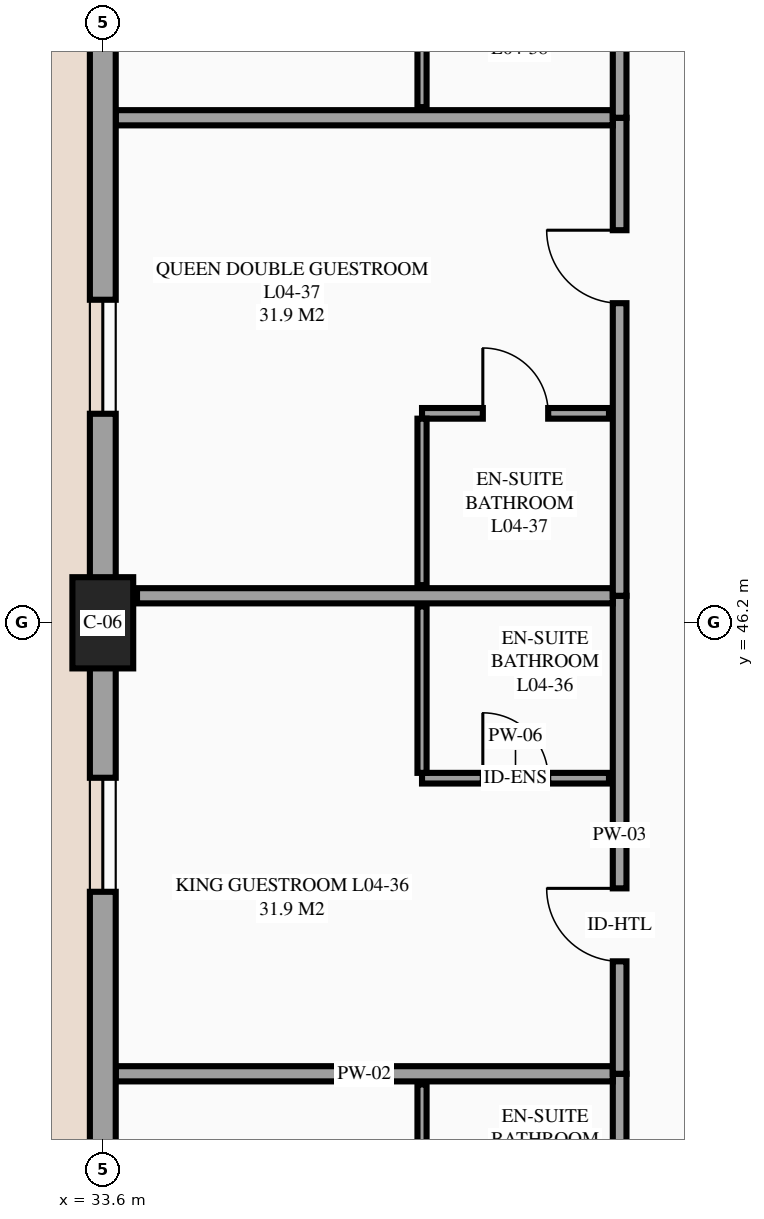
"""IFC4 building model, lengths in metres.
Left out: names, types, materials, properties, quantities, classifications, styles, units other than length and angle.
Written with IfcOpenShell. Run it as: python <this file> out.ifc"""

import sys

from ifc_helpers import new_model, si_unit, direction, frame, frame_2d, origin, origin_2d, place, context, subcontext, project, spatial, rectangle, extrude, element, fill, save


model = new_model("IFC4")
c1 = context("Model", 3, precision=1e-05, world=origin(), true_north=direction((0.0, 1.0)))
c2 = subcontext(c1, "Body", "Model", "MODEL_VIEW")
j1 = project(units=[si_unit("LENGTHUNIT", "METRE"), si_unit("PLANEANGLEUNIT", "RADIAN")], contexts=[c1])
p1 = place(None, origin())
s1 = spatial("IfcSite", under=j1, at=p1, CompositionType="ELEMENT")
p2 = place(p1, origin())
s2 = spatial("IfcBuilding", under=s1, at=p2, CompositionType="ELEMENT")
p3 = place(p2, frame((0.0, 0.0, 18.3)))
s3 = spatial("IfcBuildingStorey", under=s2, at=p3, CompositionType="ELEMENT", Elevation=18.3)
p4 = place(p3, frame((33.6, 46.2, 0.0), z_axis=(0.0, 0.0, 1.0), x_axis=(1.0, 0.0, 0.0)))
e1 = element("IfcColumn", 1, at=p4, inside=s3, PredefinedType="COLUMN", context=c2, shape_type="SweptSolid", body=[
    extrude(rectangle(XDim=0.8, YDim=1.2, at=origin_2d()), origin(), (0.0, 0.0, 1.0), 3.6),
])
p5 = place(p3, frame((40.4, 33.978, 0.0), z_axis=(0.0, 0.0, 1.0), x_axis=(0.0, 1.0, 0.0)))
e2 = element("IfcWall", 2, at=p5, inside=s3, PredefinedType="PARTITIONING", context=c2, shape_type="SweptSolid", body=[
    extrude(rectangle(XDim=6.289, YDim=0.18, at=frame_2d((3.145, 0.0))), origin(), (0.0, 0.0, 1.0), 3.375),
])
p6 = place(p5, frame((1.479, 0.0, 0.0)))
e3 = element("IfcOpeningElement", 3, at=p6, cuts=e2, PredefinedType="OPENING", context=c2, shape_type="SweptSolid", body=[
    extrude(rectangle(XDim=0.96, YDim=2.15, at=frame_2d((0.48, 1.075))), frame((0.0, 0.1, 0.0), z_axis=(0.0, -1.0, 0.0), x_axis=(1.0, 0.0, 0.0)), (0.0, 0.0, 1.0), 0.2),
])
p7 = place(p3, frame((33.77, 40.267, 0.0), z_axis=(0.0, 0.0, 1.0), x_axis=(1.0, 0.0, 0.0)))
e4 = element("IfcWall", 4, at=p7, inside=s3, PredefinedType="PARTITIONING", context=c2, shape_type="SweptSolid", body=[
    extrude(rectangle(XDim=6.54, YDim=0.2, at=frame_2d((3.27, 0.0))), origin(), (0.0, 0.0, 1.0), 3.375),
])
p8 = place(p3, frame((37.8, 37.937, 0.0), z_axis=(0.0, 0.0, 1.0), x_axis=(0.0, 1.0, 0.0)))
e5 = element("IfcWall", 5, at=p8, inside=s3, PredefinedType="PARTITIONING", context=c2, shape_type="SweptSolid", body=[
    extrude(rectangle(XDim=2.19, YDim=0.12, at=frame_2d((1.095, 0.0))), origin(), (0.0, 0.0, 1.0), 3.375),
])
p9 = place(p3, frame((40.4, 40.267, 0.0), z_axis=(0.0, 0.0, 1.0), x_axis=(0.0, 1.0, 0.0)))
e6 = element("IfcWall", 6, at=p9, inside=s3, PredefinedType="PARTITIONING", context=c2, shape_type="SweptSolid", body=[
    extrude(rectangle(XDim=6.289, YDim=0.18, at=frame_2d((3.145, 0.0))), origin(), (0.0, 0.0, 1.0), 3.375),
])
p10 = place(p9, frame((1.479, 0.0, 0.0)))
e7 = element("IfcOpeningElement", 7, at=p10, cuts=e6, PredefinedType="OPENING", context=c2, shape_type="SweptSolid", body=[
    extrude(rectangle(XDim=0.96, YDim=2.15, at=frame_2d((0.48, 1.075))), frame((0.0, 0.1, 0.0), z_axis=(0.0, -1.0, 0.0), x_axis=(1.0, 0.0, 0.0)), (0.0, 0.0, 1.0), 0.2),
])
p11 = place(p3, frame((34.05, 46.556, 0.0), z_axis=(0.0, 0.0, 1.0), x_axis=(1.0, 0.0, 0.0)))
e8 = element("IfcWall", 8, at=p11, inside=s3, PredefinedType="PARTITIONING", context=c2, shape_type="SweptSolid", body=[
    extrude(rectangle(XDim=6.26, YDim=0.2, at=frame_2d((3.13, 0.0))), origin(), (0.0, 0.0, 1.0), 3.375),
])
p12 = place(p3, frame((37.8, 44.156, 0.0), z_axis=(0.0, 0.0, 1.0), x_axis=(1.0, 0.0, 0.0)))
e9 = element("IfcWall", 9, at=p12, inside=s3, PredefinedType="PARTITIONING", context=c2, shape_type="SweptSolid", body=[
    extrude(rectangle(XDim=2.46, YDim=0.14, at=frame_2d((1.23, 0.0))), origin(), (0.0, 0.0, 1.0), 3.375),
])
p13 = place(p12, frame((0.8, 0.0, 0.0)))
e10 = element("IfcOpeningElement", 10, at=p13, cuts=e9, PredefinedType="OPENING", context=c2, shape_type="SweptSolid", body=[
    extrude(rectangle(XDim=0.86, YDim=2.1, at=frame_2d((0.43, 1.05))), frame((0.0, 0.08, 0.0), z_axis=(0.0, -1.0, 0.0), x_axis=(1.0, 0.0, 0.0)), (0.0, 0.0, 1.0), 0.16),
])
p14 = place(p3, frame((37.8, 44.226, 0.0), z_axis=(0.0, 0.0, 1.0), x_axis=(0.0, 1.0, 0.0)))
e11 = element("IfcWall", 11, at=p14, inside=s3, PredefinedType="PARTITIONING", context=c2, shape_type="SweptSolid", body=[
    extrude(rectangle(XDim=2.19, YDim=0.12, at=frame_2d((1.095, 0.0))), origin(), (0.0, 0.0, 1.0), 3.375),
])
p15 = place(p3, frame((40.4, 46.556, 0.0), z_axis=(0.0, 0.0, 1.0), x_axis=(0.0, 1.0, 0.0)))
e12 = element("IfcWall", 12, at=p15, inside=s3, PredefinedType="PARTITIONING", context=c2, shape_type="SweptSolid", body=[
    extrude(rectangle(XDim=6.289, YDim=0.18, at=frame_2d((3.145, 0.0))), origin(), (0.0, 0.0, 1.0), 3.375),
])
p16 = place(p15, frame((3.849, 0.0, 0.0)))
e13 = element("IfcOpeningElement", 13, at=p16, cuts=e12, PredefinedType="OPENING", context=c2, shape_type="SweptSolid", body=[
    extrude(rectangle(XDim=0.96, YDim=2.15, at=frame_2d((0.48, 1.075))), frame((0.0, 0.1, 0.0), z_axis=(0.0, -1.0, 0.0), x_axis=(1.0, 0.0, 0.0)), (0.0, 0.0, 1.0), 0.2),
])
p17 = place(p3, frame((33.77, 52.844, 0.0), z_axis=(0.0, 0.0, 1.0), x_axis=(1.0, 0.0, 0.0)))
e14 = element("IfcWall", 14, at=p17, inside=s3, PredefinedType="PARTITIONING", context=c2, shape_type="SweptSolid", body=[
    extrude(rectangle(XDim=6.54, YDim=0.2, at=frame_2d((3.27, 0.0))), origin(), (0.0, 0.0, 1.0), 3.375),
])
p18 = place(p3, frame((37.8, 48.956, 0.0), z_axis=(0.0, 0.0, 1.0), x_axis=(1.0, 0.0, 0.0)))
e15 = element("IfcWall", 15, at=p18, inside=s3, PredefinedType="PARTITIONING", context=c2, shape_type="SweptSolid", body=[
    extrude(rectangle(XDim=2.46, YDim=0.14, at=frame_2d((1.23, 0.0))), origin(), (0.0, 0.0, 1.0), 3.375),
])
p19 = place(p18, frame((0.8, 0.0, 0.0)))
e16 = element("IfcOpeningElement", 16, at=p19, cuts=e15, PredefinedType="OPENING", context=c2, shape_type="SweptSolid", body=[
    extrude(rectangle(XDim=0.86, YDim=2.1, at=frame_2d((0.43, 1.05))), frame((0.0, 0.08, 0.0), z_axis=(0.0, -1.0, 0.0), x_axis=(1.0, 0.0, 0.0)), (0.0, 0.0, 1.0), 0.16),
])
p20 = place(p3, frame((37.8, 46.696, 0.0), z_axis=(0.0, 0.0, 1.0), x_axis=(0.0, 1.0, 0.0)))
e17 = element("IfcWall", 17, at=p20, inside=s3, PredefinedType="PARTITIONING", context=c2, shape_type="SweptSolid", body=[
    extrude(rectangle(XDim=2.19, YDim=0.12, at=frame_2d((1.095, 0.0))), origin(), (0.0, 0.0, 1.0), 3.375),
])
p21 = place(p3, frame((40.4, 52.844, 0.0), z_axis=(0.0, 0.0, 1.0), x_axis=(0.0, 1.0, 0.0)))
e18 = element("IfcWall", 18, at=p21, inside=s3, PredefinedType="PARTITIONING", context=c2, shape_type="SweptSolid", body=[
    extrude(rectangle(XDim=6.289, YDim=0.18, at=frame_2d((3.145, 0.0))), origin(), (0.0, 0.0, 1.0), 3.375),
])
p22 = place(p21, frame((3.85, 0.0, 0.0)))
e19 = element("IfcOpeningElement", 19, at=p22, cuts=e18, PredefinedType="OPENING", context=c2, shape_type="SweptSolid", body=[
    extrude(rectangle(XDim=0.96, YDim=2.15, at=frame_2d((0.48, 1.075))), frame((0.0, 0.1, 0.0), z_axis=(0.0, -1.0, 0.0), x_axis=(1.0, 0.0, 0.0)), (0.0, 0.0, 1.0), 0.2),
])
p23 = place(p3, frame((37.8, 52.984, 0.0), z_axis=(0.0, 0.0, 1.0), x_axis=(0.0, 1.0, 0.0)))
e20 = element("IfcWall", 20, at=p23, inside=s3, PredefinedType="PARTITIONING", context=c2, shape_type="SweptSolid", body=[
    extrude(rectangle(XDim=2.19, YDim=0.12, at=frame_2d((1.095, 0.0))), origin(), (0.0, 0.0, 1.0), 3.375),
])
p24 = place(p3, frame((33.6, 54.6, 0.0), z_axis=(0.0, 0.0, 1.0), x_axis=(0.0, -1.0, 0.0)))
e21 = element("IfcWall", 21, at=p24, inside=s3, PredefinedType="STANDARD", context=c2, shape_type="SweptSolid", body=[
    extrude(rectangle(XDim=8.4, YDim=0.34, at=frame_2d((4.2, 0.0))), origin(), (0.0, 0.0, 1.0), 2.53),
])
p25 = place(p24, frame((4.15, 0.0, 0.85)))
e22 = element("IfcOpeningElement", 22, at=p25, cuts=e21, PredefinedType="OPENING", context=c2, shape_type="SweptSolid", body=[
    extrude(rectangle(XDim=1.5, YDim=1.5, at=frame_2d((0.75, 0.75))), frame((0.0, 0.18, 0.0), z_axis=(0.0, -1.0, 0.0), x_axis=(1.0, 0.0, 0.0)), (0.0, 0.0, 1.0), 0.36),
])
p26 = place(p3, frame((33.6, 46.2, 0.0), z_axis=(0.0, 0.0, 1.0), x_axis=(0.0, -1.0, 0.0)))
e23 = element("IfcWall", 23, at=p26, inside=s3, PredefinedType="STANDARD", context=c2, shape_type="SweptSolid", body=[
    extrude(rectangle(XDim=8.4, YDim=0.34, at=frame_2d((4.2, 0.0))), origin(), (0.0, 0.0, 1.0), 2.43),
])
p27 = place(p26, frame((2.039, 0.0, 0.85)))
e24 = element("IfcOpeningElement", 24, at=p27, cuts=e23, PredefinedType="OPENING", context=c2, shape_type="SweptSolid", body=[
    extrude(rectangle(XDim=1.5, YDim=1.5, at=frame_2d((0.75, 0.75))), frame((0.0, 0.18, 0.0), z_axis=(0.0, -1.0, 0.0), x_axis=(1.0, 0.0, 0.0)), (0.0, 0.0, 1.0), 0.36),
])
p28 = place(p27, origin())
e25 = element("IfcWindow", 25, at=p28, inside=s3, PartitioningType="SINGLE_PANEL", PredefinedType="WINDOW", context=c2, shape_type="SweptSolid", body=[
    extrude(rectangle(XDim=1.5, YDim=1.5, at=frame_2d((0.75, 0.75))), frame((0.0, 0.03, 0.0), z_axis=(0.0, -1.0, 0.0), x_axis=(1.0, 0.0, 0.0)), (0.0, 0.0, 1.0), 0.06),
])
fill(e24, e25)
p29 = place(p25, origin())
e26 = element("IfcWindow", 26, at=p29, inside=s3, PartitioningType="SINGLE_PANEL", PredefinedType="WINDOW", context=c2, shape_type="SweptSolid", body=[
    extrude(rectangle(XDim=1.5, YDim=1.5, at=frame_2d((0.75, 0.75))), frame((0.0, 0.03, 0.0), z_axis=(0.0, -1.0, 0.0), x_axis=(1.0, 0.0, 0.0)), (0.0, 0.0, 1.0), 0.06),
])
fill(e22, e26)
p30 = place(p10, origin())
e27 = element("IfcDoor", 27, at=p30, inside=s3, OperationType="SINGLE_SWING_RIGHT", PredefinedType="DOOR", context=c2, shape_type="SweptSolid", body=[
    extrude(rectangle(XDim=0.96, YDim=2.15, at=frame_2d((0.48, 1.075))), frame((0.0, 0.025, 0.0), z_axis=(0.0, -1.0, 0.0), x_axis=(1.0, 0.0, 0.0)), (0.0, 0.0, 1.0), 0.05),
])
fill(e7, e27)
p31 = place(p13, origin())
e28 = element("IfcDoor", 28, at=p31, inside=s3, OperationType="SINGLE_SWING_LEFT", PredefinedType="DOOR", context=c2, shape_type="SweptSolid", body=[
    extrude(rectangle(XDim=0.86, YDim=2.1, at=frame_2d((0.43, 1.05))), frame((0.0, 0.025, 0.0), z_axis=(0.0, -1.0, 0.0), x_axis=(1.0, 0.0, 0.0)), (0.0, 0.0, 1.0), 0.05),
])
fill(e10, e28)
p32 = place(p16, origin())
e29 = element("IfcDoor", 29, at=p32, inside=s3, OperationType="SINGLE_SWING_RIGHT", PredefinedType="DOOR", context=c2, shape_type="SweptSolid", body=[
    extrude(rectangle(XDim=0.96, YDim=2.15, at=frame_2d((0.48, 1.075))), frame((0.0, 0.025, 0.0), z_axis=(0.0, -1.0, 0.0), x_axis=(1.0, 0.0, 0.0)), (0.0, 0.0, 1.0), 0.05),
])
fill(e13, e29)
p33 = place(p19, origin())
e30 = element("IfcDoor", 30, at=p33, inside=s3, OperationType="SINGLE_SWING_LEFT", PredefinedType="DOOR", context=c2, shape_type="SweptSolid", body=[
    extrude(rectangle(XDim=0.86, YDim=2.1, at=frame_2d((0.43, 1.05))), frame((0.0, 0.025, 0.0), z_axis=(0.0, -1.0, 0.0), x_axis=(1.0, 0.0, 0.0)), (0.0, 0.0, 1.0), 0.05),
])
fill(e16, e30)
save(model, sys.argv[1])
